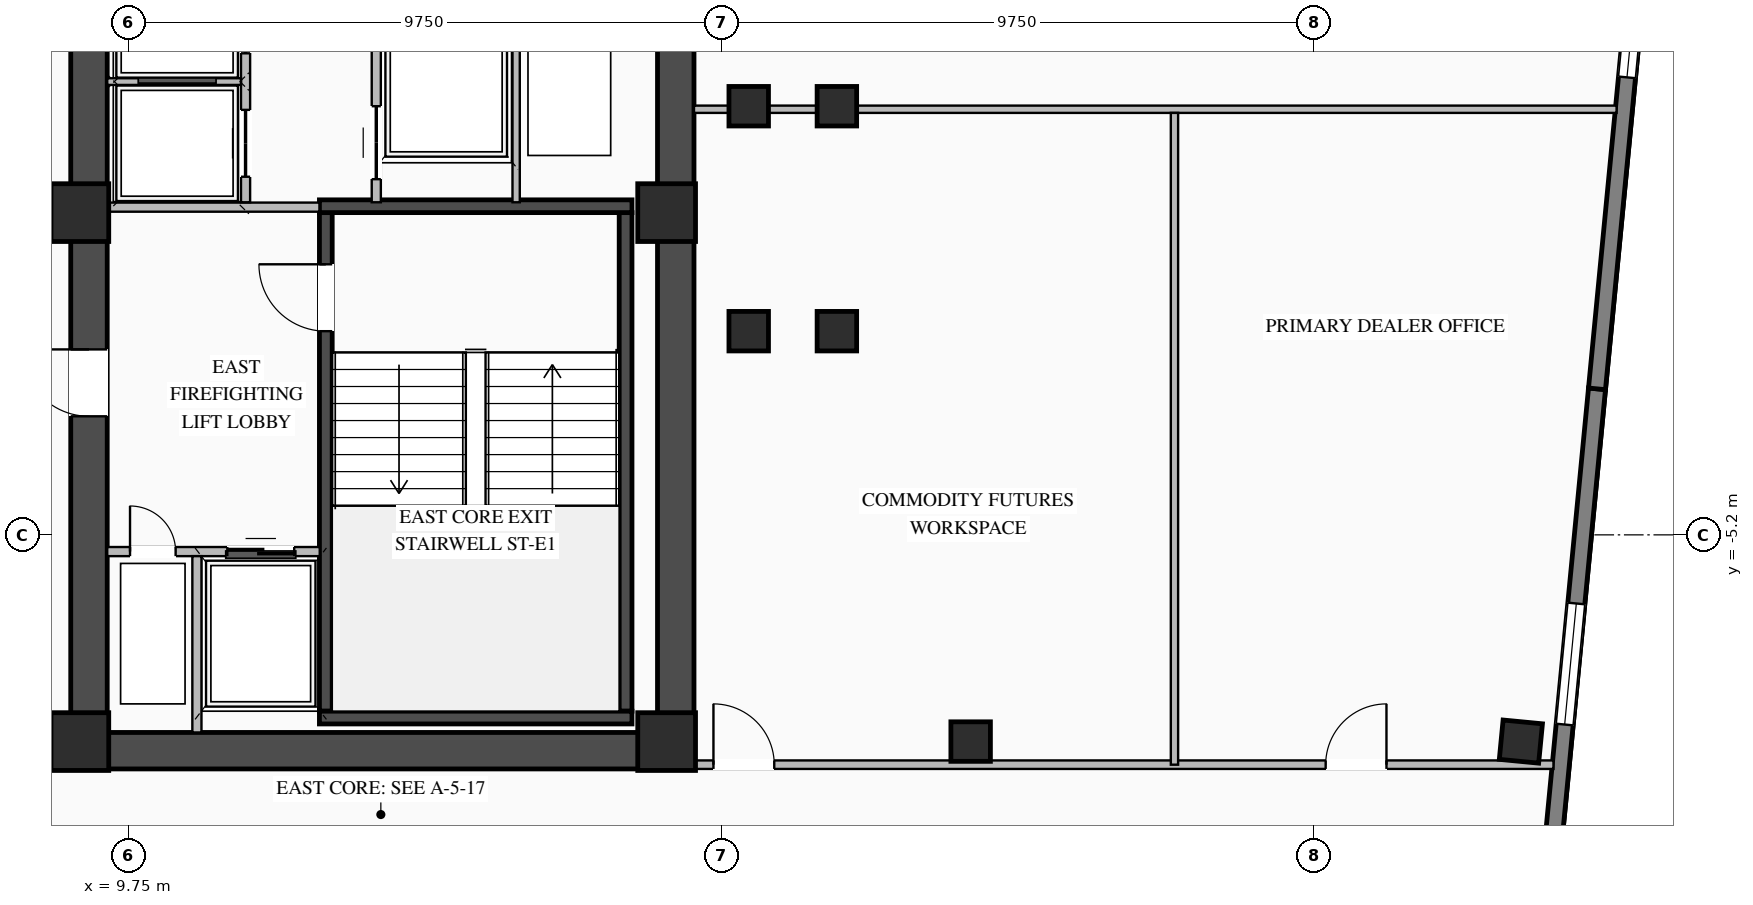
"""IFC4 building model, lengths in metres.
Left out: names, types, materials, properties, quantities, classifications, styles, units other than length and angle.
Written with IfcOpenShell. Run it as: python <this file> out.ifc"""

import sys

from ifc_helpers import new_model, si_unit, direction, frame, frame_2d, origin, origin_2d, place, context, subcontext, project, spatial, rectangle, i_section, extrude, element, fill, save


model = new_model("IFC4")
c1 = context("Model", 3, precision=1e-05, world=origin(), true_north=direction((0.0, 1.0)))
c2 = subcontext(c1, "Body", "Model", "MODEL_VIEW")
j1 = project(units=[si_unit("LENGTHUNIT", "METRE"), si_unit("PLANEANGLEUNIT", "RADIAN")], contexts=[c1])
p1 = place(None, origin())
s1 = spatial("IfcSite", under=j1, at=p1, CompositionType="ELEMENT")
p2 = place(p1, origin())
s2 = spatial("IfcBuilding", under=s1, at=p2, CompositionType="ELEMENT")
p3 = place(p2, frame((0.0, 0.0, 181.1)))
s3 = spatial("IfcBuildingStorey", under=s2, at=p3, CompositionType="ELEMENT", Elevation=181.1)
p4 = place(p3, frame((8.8, -8.75, 0.0), z_axis=(0.0, 0.0, 1.0), x_axis=(1.0, 0.0, 0.0)))
e1 = element("IfcWall", 1, at=p4, inside=s3, PredefinedType="SHEAR", context=c2, shape_type="SweptSolid", body=[
    extrude(rectangle(XDim=10.25, YDim=0.6, at=frame_2d((5.125, 0.0))), origin(), (0.0, 0.0, 1.0), 3.27),
])
p5 = place(p3, frame((9.1, -8.45, 0.0), z_axis=(0.0, 0.0, 1.0), x_axis=(0.0, 1.0, 0.0)))
e2 = element("IfcWall", 2, at=p5, inside=s3, PredefinedType="SHEAR", context=c2, shape_type="SweptSolid", body=[
    extrude(rectangle(XDim=16.9, YDim=0.6, at=frame_2d((8.45, 0.0))), origin(), (0.0, 0.0, 1.0), 3.27),
])
p6 = place(p5, frame((5.2, 0.0, 0.0)))
e3 = element("IfcOpeningElement", 3, at=p6, cuts=e2, PredefinedType="OPENING", context=c2, shape_type="SweptSolid", body=[
    extrude(rectangle(XDim=1.1, YDim=2.08, at=frame_2d((0.55, 1.04))), frame((0.0, 0.31, 0.0), z_axis=(0.0, -1.0, 0.0), x_axis=(1.0, 0.0, 0.0)), (0.0, 0.0, 1.0), 0.62),
])
p7 = place(p3, frame((18.75, -8.45, 0.0), z_axis=(0.0, 0.0, 1.0), x_axis=(0.0, 1.0, 0.0)))
e4 = element("IfcWall", 4, at=p7, inside=s3, PredefinedType="SHEAR", context=c2, shape_type="SweptSolid", body=[
    extrude(rectangle(XDim=16.9, YDim=0.6, at=frame_2d((8.45, 0.0))), origin(), (0.0, 0.0, 1.0), 3.27),
])
p8 = place(p3, frame((12.995, -8.1, 0.0), z_axis=(0.0, 0.0, 1.0), x_axis=(0.0, 1.0, 0.0)))
e5 = element("IfcWall", 5, at=p8, inside=s3, PredefinedType="SHEAR", context=c2, shape_type="SweptSolid", body=[
    extrude(rectangle(XDim=8.2, YDim=0.21, at=frame_2d((4.1, 0.0))), origin(), (0.0, 0.0, 1.0), 3.27),
])
p9 = place(p8, frame((6.25, 0.0, 0.0)))
e6 = element("IfcOpeningElement", 6, at=p9, cuts=e5, PredefinedType="OPENING", context=c2, shape_type="SweptSolid", body=[
    extrude(rectangle(XDim=1.1, YDim=2.15, at=frame_2d((0.55, 1.075))), frame((0.0, 0.115, 0.0), z_axis=(0.0, -1.0, 0.0), x_axis=(1.0, 0.0, 0.0)), (0.0, 0.0, 1.0), 0.23),
])
p10 = place(p3, frame((17.925, -8.1, 0.0), z_axis=(0.0, 0.0, 1.0), x_axis=(0.0, 1.0, 0.0)))
e7 = element("IfcWall", 7, at=p10, inside=s3, PredefinedType="SHEAR", context=c2, shape_type="SweptSolid", body=[
    extrude(rectangle(XDim=8.2, YDim=0.21, at=frame_2d((4.1, 0.0))), origin(), (0.0, 0.0, 1.0), 3.27),
])
for number, where, z_axis, x_axis in (
    (8, (12.89, -8.205, 0.0), (0.0, 0.0, 1.0), (1.0, 0.0, 0.0)),
    (9, (18.03, 0.205, 0.0), (0.0, 0.0, 1.0), (-1.0, 0.0, 0.0)),
):
    element("IfcWall", number, at=place(p3, frame(where, z_axis=z_axis, x_axis=x_axis)), inside=s3, PredefinedType="SHEAR", context=c2, shape_type="SweptSolid", body=[
        extrude(rectangle(XDim=5.14, YDim=0.21, at=frame_2d((2.57, 0.0))), origin(), (0.0, 0.0, 1.0), 3.27),
    ])
for number, where, z_axis, x_axis in (
    (10, (8.95, -8.6, 0.0), (0.0, 0.0, 1.0), (1.0, 0.0, 0.0)),
    (11, (8.95, 0.1, 0.0), (0.0, 0.0, 1.0), (1.0, 0.0, 0.0)),
    (12, (18.6, -8.6, 0.0), (0.0, 0.0, 1.0), (1.0, 0.0, 0.0)),
    (13, (18.6, 0.1, 0.0), (0.0, 0.0, 1.0), (1.0, 0.0, 0.0)),
):
    element("IfcColumn", number, at=place(p3, frame(where, z_axis=z_axis, x_axis=x_axis)), inside=s3, PredefinedType="COLUMN", context=c2, shape_type="SweptSolid", body=[
        extrude(rectangle(XDim=0.95, YDim=0.95, at=origin_2d()), origin(), (0.0, 0.0, 1.0), 3.45),
    ])
for number, where, z_axis, x_axis in (
    (14, (19.95, -1.85, 0.0), (0.0, 0.0, 1.0), (1.0, 0.0, 0.0)),
    (15, (19.95, 1.85, 0.0), (0.0, 0.0, 1.0), (1.0, 0.0, 0.0)),
    (16, (21.4, -1.85, 0.0), (0.0, 0.0, 1.0), (1.0, 0.0, 0.0)),
    (17, (21.4, 1.85, 0.0), (0.0, 0.0, 1.0), (1.0, 0.0, 0.0)),
    (18, (23.6, -8.6, 0.0), (0.0, 0.0, 1.0), (1.0, 0.0, 0.0)),
    (19, (32.649, -8.6, 0.0), (0.0, 0.0, 1.0), (0.995, -0.096, 0.0)),
):
    element("IfcColumn", number, at=place(p3, frame(where, z_axis=z_axis, x_axis=x_axis)), inside=s3, PredefinedType="COLUMN", context=c2, shape_type="SweptSolid", body=[
        extrude(i_section(OverallWidth=0.65, OverallDepth=0.65, WebThickness=0.028, FlangeThickness=0.04, at=origin_2d()), origin(), (0.0, 0.0, 1.0), 3.45),
    ])
p11 = place(p3, frame((33.901, -2.798, 0.0), z_axis=(0.0, 0.0, 1.0), x_axis=(-0.095853434568, -0.99539545864, 0.0)))
e20 = element("IfcWall", 20, at=p11, inside=s3, PredefinedType="STANDARD", context=c2, shape_type="SweptSolid", body=[
    extrude(rectangle(XDim=16.79, YDim=0.28, at=frame_2d((8.395, 0.0))), origin(), (0.0, 0.0, 1.0), 3.25),
])
p12 = place(p11, frame((3.547, 0.0, 0.76)))
e21 = element("IfcOpeningElement", 21, at=p12, cuts=e20, PredefinedType="OPENING", context=c2, shape_type="SweptSolid", body=[
    extrude(rectangle(XDim=2.0, YDim=2.05, at=frame_2d((1.0, 1.025))), frame((0.0, 0.15, 0.0), z_axis=(0.0, -1.0, 0.0), x_axis=(1.0, 0.0, 0.0)), (0.0, 0.0, 1.0), 0.3),
])
p13 = place(p11, frame((10.193, 0.0, 0.76)))
e22 = element("IfcOpeningElement", 22, at=p13, cuts=e20, PredefinedType="OPENING", context=c2, shape_type="SweptSolid", body=[
    extrude(rectangle(XDim=2.0, YDim=2.05, at=frame_2d((1.0, 1.025))), frame((0.0, 0.15, 0.0), z_axis=(0.0, -1.0, 0.0), x_axis=(1.0, 0.0, 0.0)), (0.0, 0.0, 1.0), 0.3),
])
p14 = place(p3, frame((35.51, 13.914, 0.0), z_axis=(0.0, 0.0, 1.0), x_axis=(-0.095839027265, -0.995396845913, 0.0)))
e23 = element("IfcWall", 23, at=p14, inside=s3, PredefinedType="STANDARD", context=c2, shape_type="SweptSolid", body=[
    extrude(rectangle(XDim=16.79, YDim=0.28, at=frame_2d((8.395, 0.0))), origin(), (0.0, 0.0, 1.0), 3.25),
])
p15 = place(p14, frame((5.647, 0.0, 0.76)))
e24 = element("IfcOpeningElement", 24, at=p15, cuts=e23, PredefinedType="OPENING", context=c2, shape_type="SweptSolid", body=[
    extrude(rectangle(XDim=2.0, YDim=2.05, at=frame_2d((1.0, 1.025))), frame((0.0, 0.15, 0.0), z_axis=(0.0, -1.0, 0.0), x_axis=(1.0, 0.0, 0.0)), (0.0, 0.0, 1.0), 0.3),
])
p16 = place(p14, frame((9.643, 0.0, 0.76)))
e25 = element("IfcOpeningElement", 25, at=p16, cuts=e23, PredefinedType="OPENING", context=c2, shape_type="SweptSolid", body=[
    extrude(rectangle(XDim=2.0, YDim=2.05, at=frame_2d((1.0, 1.025))), frame((0.0, 0.15, 0.0), z_axis=(0.0, -1.0, 0.0), x_axis=(1.0, 0.0, 0.0)), (0.0, 0.0, 1.0), 0.3),
])
p17 = place(p3, frame((9.4, -5.475, 0.0), z_axis=(0.0, 0.0, 1.0), x_axis=(1.0, 0.0, 0.0)))
e26 = element("IfcWall", 26, at=p17, inside=s3, PredefinedType="STANDARD", context=c2, shape_type="SweptSolid", body=[
    extrude(rectangle(XDim=3.495, YDim=0.15, at=frame_2d((1.748, 0.0))), origin(), (0.0, 0.0, 1.0), 3.25),
])
p18 = place(p17, frame((1.975, 0.0, 0.0)))
e27 = element("IfcOpeningElement", 27, at=p18, cuts=e26, PredefinedType="OPENING", context=c2, shape_type="SweptSolid", body=[
    extrude(rectangle(XDim=1.1, YDim=2.15, at=frame_2d((0.55, 1.075))), frame((0.0, 0.085, 0.0), z_axis=(0.0, -1.0, 0.0), x_axis=(1.0, 0.0, 0.0)), (0.0, 0.0, 1.0), 0.17),
])
p19 = place(p17, frame((0.375, 0.0, 0.0)))
e28 = element("IfcOpeningElement", 28, at=p19, cuts=e26, PredefinedType="OPENING", context=c2, shape_type="SweptSolid", body=[
    extrude(rectangle(XDim=0.75, YDim=2.05, at=frame_2d((0.375, 1.025))), frame((0.0, 0.085, 0.0), z_axis=(0.0, -1.0, 0.0), x_axis=(1.0, 0.0, 0.0)), (0.0, 0.0, 1.0), 0.17),
])
p20 = place(p3, frame((10.875, -8.45, 0.0), z_axis=(0.0, 0.0, 1.0), x_axis=(0.0, 1.0, 0.0)))
e29 = element("IfcWall", 29, at=p20, inside=s3, PredefinedType="STANDARD", context=c2, shape_type="SweptSolid", body=[
    extrude(rectangle(XDim=2.9, YDim=0.15, at=frame_2d((1.45, 0.0))), origin(), (0.0, 0.0, 1.0), 3.25),
])
p21 = place(p3, frame((9.4, 0.19, 0.0), z_axis=(0.0, 0.0, 1.0), x_axis=(1.0, 0.0, 0.0)))
e30 = element("IfcWall", 30, at=p21, inside=s3, PredefinedType="STANDARD", context=c2, shape_type="SweptSolid", body=[
    extrude(rectangle(XDim=3.49, YDim=0.15, at=frame_2d((1.745, 0.0))), origin(), (0.0, 0.0, 1.0), 2.645),
])
p22 = place(p3, frame((11.675, 0.27, 0.0), z_axis=(0.0, 0.0, 1.0), x_axis=(0.0, 1.0, 0.0)))
e31 = element("IfcWall", 31, at=p22, inside=s3, PredefinedType="STANDARD", context=c2, shape_type="SweptSolid", body=[
    extrude(rectangle(XDim=8.18, YDim=0.15, at=frame_2d((4.09, 0.0))), origin(), (0.0, 0.0, 1.0), 3.25),
])
p23 = place(p22, frame((0.42, 0.0, 0.0)))
e32 = element("IfcOpeningElement", 32, at=p23, cuts=e31, PredefinedType="OPENING", context=c2, shape_type="SweptSolid", body=[
    extrude(rectangle(XDim=1.1, YDim=2.1, at=frame_2d((0.55, 1.05))), frame((0.0, 0.085, 0.0), z_axis=(0.0, -1.0, 0.0), x_axis=(1.0, 0.0, 0.0)), (0.0, 0.0, 1.0), 0.17),
])
p24 = place(p22, frame((2.45, 0.0, 0.0)))
e33 = element("IfcOpeningElement", 33, at=p24, cuts=e31, PredefinedType="OPENING", context=c2, shape_type="SweptSolid", body=[
    extrude(rectangle(XDim=1.1, YDim=2.1, at=frame_2d((0.55, 1.05))), frame((0.0, 0.085, 0.0), z_axis=(0.0, -1.0, 0.0), x_axis=(1.0, 0.0, 0.0)), (0.0, 0.0, 1.0), 0.17),
])
p25 = place(p22, frame((4.48, 0.0, 0.0)))
e34 = element("IfcOpeningElement", 34, at=p25, cuts=e31, PredefinedType="OPENING", context=c2, shape_type="SweptSolid", body=[
    extrude(rectangle(XDim=1.1, YDim=2.1, at=frame_2d((0.55, 1.05))), frame((0.0, 0.085, 0.0), z_axis=(0.0, -1.0, 0.0), x_axis=(1.0, 0.0, 0.0)), (0.0, 0.0, 1.0), 0.17),
])
p26 = place(p22, frame((6.51, 0.0, 0.0)))
e35 = element("IfcOpeningElement", 35, at=p26, cuts=e31, PredefinedType="OPENING", context=c2, shape_type="SweptSolid", body=[
    extrude(rectangle(XDim=1.1, YDim=2.1, at=frame_2d((0.55, 1.05))), frame((0.0, 0.085, 0.0), z_axis=(0.0, -1.0, 0.0), x_axis=(1.0, 0.0, 0.0)), (0.0, 0.0, 1.0), 0.17),
])
p27 = place(p3, frame((9.4, 2.255, 0.0), z_axis=(0.0, 0.0, 1.0), x_axis=(1.0, 0.0, 0.0)))
e36 = element("IfcWall", 36, at=p27, inside=s3, PredefinedType="STANDARD", context=c2, shape_type="SweptSolid", body=[
    extrude(rectangle(XDim=2.2, YDim=0.11, at=frame_2d((1.1, 0.0))), origin(), (0.0, 0.0, 1.0), 3.25),
])
p28 = place(p3, frame((13.825, 0.27, 0.0), z_axis=(0.0, 0.0, 1.0), x_axis=(0.0, 1.0, 0.0)))
e37 = element("IfcWall", 37, at=p28, inside=s3, PredefinedType="STANDARD", context=c2, shape_type="SweptSolid", body=[
    extrude(rectangle(XDim=8.18, YDim=0.15, at=frame_2d((4.09, 0.0))), origin(), (0.0, 0.0, 1.0), 3.25),
])
p29 = place(p28, frame((0.38, 0.0, 0.0)))
e38 = element("IfcOpeningElement", 38, at=p29, cuts=e37, PredefinedType="OPENING", context=c2, shape_type="SweptSolid", body=[
    extrude(rectangle(XDim=1.2, YDim=2.1, at=frame_2d((0.6, 1.05))), frame((0.0, 0.085, 0.0), z_axis=(0.0, -1.0, 0.0), x_axis=(1.0, 0.0, 0.0)), (0.0, 0.0, 1.0), 0.17),
])
p30 = place(p3, frame((16.125, 0.27, 0.0), z_axis=(0.0, 0.0, 1.0), x_axis=(0.0, 1.0, 0.0)))
e39 = element("IfcWall", 39, at=p30, inside=s3, PredefinedType="STANDARD", context=c2, shape_type="SweptSolid", body=[
    extrude(rectangle(XDim=3.59, YDim=0.12, at=frame_2d((1.795, 0.0))), origin(), (0.0, 0.0, 1.0), 3.25),
])
p31 = place(p3, frame((19.05, -8.98, 0.0), z_axis=(0.0, 0.0, 1.0), x_axis=(1.0, 0.0, 0.0)))
e40 = element("IfcWall", 40, at=p31, inside=s3, PredefinedType="STANDARD", context=c2, shape_type="SweptSolid", body=[
    extrude(rectangle(XDim=14.135, YDim=0.14, at=frame_2d((7.067, 0.0))), origin(), (0.0, 0.0, 1.0), 3.25),
])
p32 = place(p31, frame((0.32, 0.0, 0.0)))
e41 = element("IfcOpeningElement", 41, at=p32, cuts=e40, PredefinedType="OPENING", context=c2, shape_type="SweptSolid", body=[
    extrude(rectangle(XDim=1.0, YDim=2.08, at=frame_2d((0.5, 1.04))), frame((0.0, 0.08, 0.0), z_axis=(0.0, -1.0, 0.0), x_axis=(1.0, 0.0, 0.0)), (0.0, 0.0, 1.0), 0.16),
])
p33 = place(p31, frame((10.388, 0.0, 0.0)))
e42 = element("IfcOpeningElement", 42, at=p33, cuts=e40, PredefinedType="OPENING", context=c2, shape_type="SweptSolid", body=[
    extrude(rectangle(XDim=1.0, YDim=2.08, at=frame_2d((0.5, 1.04))), frame((0.0, 0.08, 0.0), z_axis=(0.0, -1.0, 0.0), x_axis=(1.0, 0.0, 0.0)), (0.0, 0.0, 1.0), 0.16),
])
p34 = place(p3, frame((19.05, 1.8, 0.0), z_axis=(0.0, 0.0, 1.0), x_axis=(1.0, 0.0, 0.0)))
e43 = element("IfcWall", 43, at=p34, inside=s3, PredefinedType="STANDARD", context=c2, shape_type="SweptSolid", body=[
    extrude(rectangle(XDim=15.173, YDim=0.12, at=frame_2d((7.586, 0.0))), origin(), (0.0, 0.0, 1.0), 3.25),
])
p35 = place(p3, frame((26.952, -8.98, 0.0), z_axis=(0.0, 0.0, 1.0), x_axis=(0.0, 1.0, 0.0)))
e44 = element("IfcWall", 44, at=p35, inside=s3, PredefinedType="STANDARD", context=c2, shape_type="SweptSolid", body=[
    extrude(rectangle(XDim=10.72, YDim=0.12, at=frame_2d((5.36, 0.0))), origin(), (0.0, 0.0, 1.0), 3.25),
])
p36 = place(p12, origin())
e45 = element("IfcWindow", 45, at=p36, inside=s3, PartitioningType="DOUBLE_PANEL_VERTICAL", PredefinedType="WINDOW", context=c2, shape_type="SweptSolid", body=[
    extrude(rectangle(XDim=2.0, YDim=2.05, at=frame_2d((1.0, 1.025))), frame((0.0, 0.03, 0.0), z_axis=(0.0, -1.0, 0.0), x_axis=(1.0, 0.0, 0.0)), (0.0, 0.0, 1.0), 0.06),
])
fill(e21, e45)
p37 = place(p16, origin())
e46 = element("IfcWindow", 46, at=p37, inside=s3, PartitioningType="DOUBLE_PANEL_VERTICAL", PredefinedType="WINDOW", context=c2, shape_type="SweptSolid", body=[
    extrude(rectangle(XDim=2.0, YDim=2.05, at=frame_2d((1.0, 1.025))), frame((0.0, 0.03, 0.0), z_axis=(0.0, -1.0, 0.0), x_axis=(1.0, 0.0, 0.0)), (0.0, 0.0, 1.0), 0.06),
])
fill(e25, e46)
p38 = place(p9, origin())
e47 = element("IfcDoor", 47, at=p38, inside=s3, OperationType="SINGLE_SWING_RIGHT", PredefinedType="DOOR", context=c2, shape_type="SweptSolid", body=[
    extrude(rectangle(XDim=1.1, YDim=2.15, at=frame_2d((0.55, 1.075))), frame((0.0, 0.025, 0.0), z_axis=(0.0, -1.0, 0.0), x_axis=(1.0, 0.0, 0.0)), (0.0, 0.0, 1.0), 0.05),
])
fill(e6, e47)
p39 = place(p18, origin())
e48 = element("IfcDoor", 48, at=p39, inside=s3, OperationType="DOUBLE_DOOR_SLIDING", PredefinedType="DOOR", context=c2, shape_type="SweptSolid", body=[
    extrude(rectangle(XDim=1.1, YDim=2.15, at=frame_2d((0.55, 1.075))), frame((0.0, 0.025, 0.0), z_axis=(0.0, -1.0, 0.0), x_axis=(1.0, 0.0, 0.0)), (0.0, 0.0, 1.0), 0.05),
])
fill(e27, e48)
p40 = place(p19, origin())
e49 = element("IfcDoor", 49, at=p40, inside=s3, OperationType="SINGLE_SWING_LEFT", PredefinedType="DOOR", context=c2, shape_type="SweptSolid", body=[
    extrude(rectangle(XDim=0.75, YDim=2.05, at=frame_2d((0.375, 1.025))), frame((0.0, 0.025, 0.0), z_axis=(0.0, -1.0, 0.0), x_axis=(1.0, 0.0, 0.0)), (0.0, 0.0, 1.0), 0.05),
])
fill(e28, e49)
p41 = place(p6, origin())
e50 = element("IfcDoor", 50, at=p41, inside=s3, OperationType="SINGLE_SWING_RIGHT", PredefinedType="DOOR", context=c2, shape_type="SweptSolid", body=[
    extrude(rectangle(XDim=1.1, YDim=2.08, at=frame_2d((0.55, 1.04))), frame((0.0, -0.205, 0.0), z_axis=(0.0, -1.0, 0.0), x_axis=(1.0, 0.0, 0.0)), (0.0, 0.0, 1.0), 0.05),
])
fill(e3, e50)
p42 = place(p23, origin())
e51 = element("IfcDoor", 51, at=p42, inside=s3, OperationType="DOUBLE_DOOR_SLIDING", PredefinedType="DOOR", context=c2, shape_type="SweptSolid", body=[
    extrude(rectangle(XDim=1.1, YDim=2.1, at=frame_2d((0.55, 1.05))), frame((0.0, 0.025, 0.0), z_axis=(0.0, -1.0, 0.0), x_axis=(1.0, 0.0, 0.0)), (0.0, 0.0, 1.0), 0.05),
])
fill(e32, e51)
p43 = place(p24, origin())
e52 = element("IfcDoor", 52, at=p43, inside=s3, OperationType="DOUBLE_DOOR_SLIDING", PredefinedType="DOOR", context=c2, shape_type="SweptSolid", body=[
    extrude(rectangle(XDim=1.1, YDim=2.1, at=frame_2d((0.55, 1.05))), frame((0.0, 0.025, 0.0), z_axis=(0.0, -1.0, 0.0), x_axis=(1.0, 0.0, 0.0)), (0.0, 0.0, 1.0), 0.05),
])
fill(e33, e52)
p44 = place(p29, origin())
e53 = element("IfcDoor", 53, at=p44, inside=s3, OperationType="DOUBLE_DOOR_SLIDING", PredefinedType="DOOR", context=c2, shape_type="SweptSolid", body=[
    extrude(rectangle(XDim=1.2, YDim=2.1, at=frame_2d((0.6, 1.05))), frame((0.0, 0.025, 0.0), z_axis=(0.0, -1.0, 0.0), x_axis=(1.0, 0.0, 0.0)), (0.0, 0.0, 1.0), 0.05),
])
fill(e38, e53)
p45 = place(p32, origin())
e54 = element("IfcDoor", 54, at=p45, inside=s3, OperationType="SINGLE_SWING_LEFT", PredefinedType="DOOR", context=c2, shape_type="SweptSolid", body=[
    extrude(rectangle(XDim=1.0, YDim=2.08, at=frame_2d((0.5, 1.04))), frame((0.0, 0.025, 0.0), z_axis=(0.0, -1.0, 0.0), x_axis=(1.0, 0.0, 0.0)), (0.0, 0.0, 1.0), 0.05),
])
fill(e41, e54)
p46 = place(p33, origin())
e55 = element("IfcDoor", 55, at=p46, inside=s3, OperationType="SINGLE_SWING_RIGHT", PredefinedType="DOOR", context=c2, shape_type="SweptSolid", body=[
    extrude(rectangle(XDim=1.0, YDim=2.08, at=frame_2d((0.5, 1.04))), frame((0.0, 0.025, 0.0), z_axis=(0.0, -1.0, 0.0), x_axis=(1.0, 0.0, 0.0)), (0.0, 0.0, 1.0), 0.05),
])
fill(e42, e55)
save(model, sys.argv[1])
